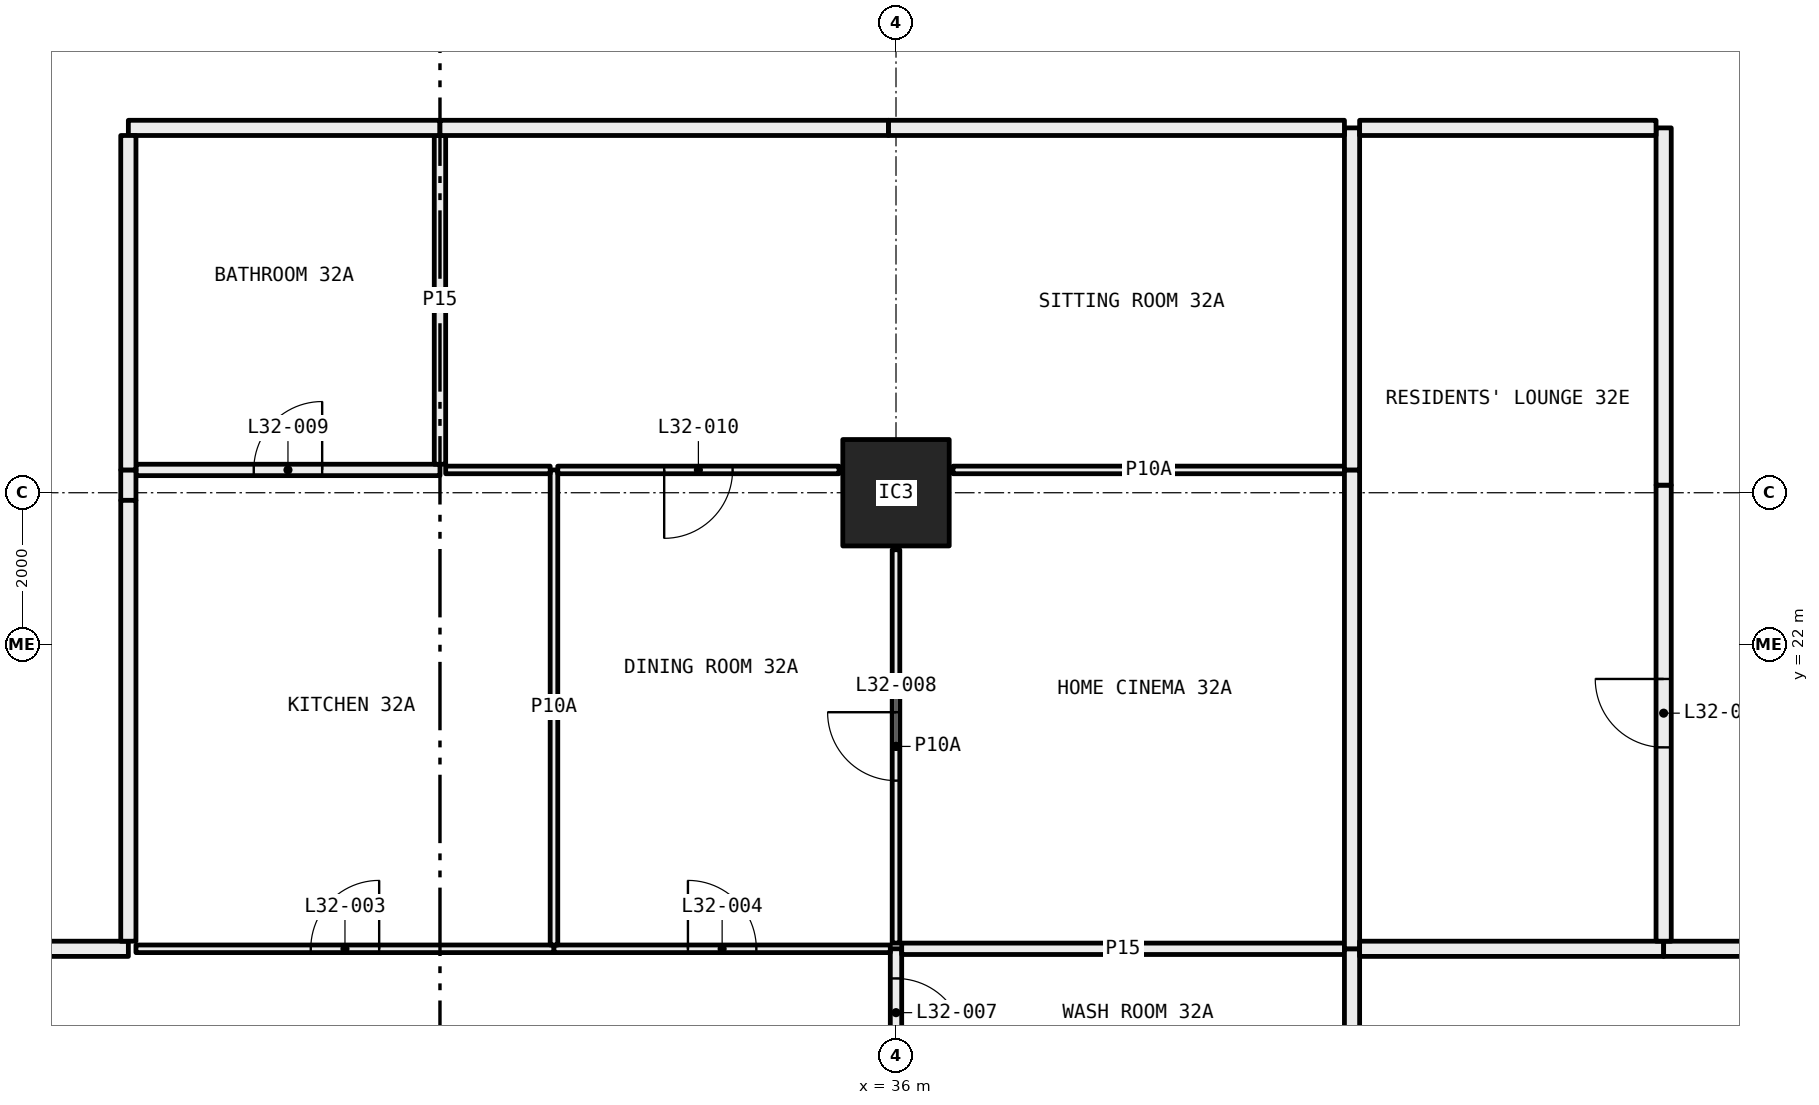
"""IFC4 building model, lengths in metres.
Left out: names, types, materials, properties, quantities, classifications, styles, units other than length and angle.
Written with IfcOpenShell. Run it as: python <this file> out.ifc"""

import sys

from ifc_helpers import new_model, si_unit, direction, frame, frame_2d, origin, origin_2d, place, context, subcontext, project, spatial, rectangle, hollow_rectangle, extrude, element, fill, save


model = new_model("IFC4")
c1 = context("Model", 3, precision=1e-05, world=origin(), true_north=direction((0.0, 1.0)))
c2 = subcontext(c1, "Body", "Model", "MODEL_VIEW")
j1 = project(units=[si_unit("LENGTHUNIT", "METRE"), si_unit("PLANEANGLEUNIT", "RADIAN")], contexts=[c1])
p1 = place(None, origin())
s1 = spatial("IfcSite", under=j1, at=p1, CompositionType="ELEMENT")
p2 = place(p1, origin())
s2 = spatial("IfcBuilding", under=s1, at=p2, CompositionType="ELEMENT")
p3 = place(p2, frame((0.0, 0.0, 124.2)))
s3 = spatial("IfcBuildingStorey", under=s2, at=p3, CompositionType="ELEMENT", Elevation=124.2)
p4 = place(p3, frame((36.0, 24.0, 0.0), z_axis=(0.0, 0.0, 1.0), x_axis=(1.0, 0.0, 0.0)))
e1 = element("IfcColumn", 1, at=p4, inside=s3, PredefinedType="COLUMN", context=c2, shape_type="SweptSolid", body=[
    extrude(hollow_rectangle(XDim=1.4, YDim=1.4, WallThickness=0.06, at=origin_2d()), origin(), (0.0, 0.0, 1.0), 3.05),
])
p5 = place(p3, frame((36.0, 16.32, 0.0), z_axis=(0.0, 0.0, 1.0), x_axis=(0.0, 1.0, 0.0)))
e2 = element("IfcWall", 2, at=p5, inside=s3, PredefinedType="PARTITIONING", context=c2, shape_type="SweptSolid", body=[
    extrude(rectangle(XDim=1.68, YDim=0.15, at=frame_2d((0.84, 0.0))), origin(), (0.0, 0.0, 1.0), 2.45),
])
p6 = place(p5, frame((0.39, 0.0, 0.0)))
e3 = element("IfcOpeningElement", 3, at=p6, cuts=e2, PredefinedType="OPENING", context=c2, shape_type="SweptSolid", body=[
    extrude(rectangle(XDim=0.9, YDim=2.1, at=frame_2d((0.45, 1.05))), frame((0.0, 0.085, 0.0), z_axis=(0.0, -1.0, 0.0), x_axis=(1.0, 0.0, 0.0)), (0.0, 0.0, 1.0), 0.17),
])
p7 = place(p3, frame((31.5, 18.0, 0.0), z_axis=(0.0, 0.0, 1.0), x_axis=(-1.0, 0.0, 0.0)))
e4 = element("IfcWall", 4, at=p7, inside=s3, PredefinedType="PARTITIONING", context=c2, shape_type="SweptSolid", body=[
    extrude(rectangle(XDim=5.5, YDim=0.1, at=frame_2d((2.75, 0.0))), origin(), (0.0, 0.0, 1.0), 3.05),
])
p8 = place(p7, frame((2.3, 0.0, 0.0)))
e5 = element("IfcOpeningElement", 5, at=p8, cuts=e4, PredefinedType="OPENING", context=c2, shape_type="SweptSolid", body=[
    extrude(rectangle(XDim=0.9, YDim=2.1, at=frame_2d((0.45, 1.05))), frame((0.0, 0.06, 0.0), z_axis=(0.0, -1.0, 0.0), x_axis=(1.0, 0.0, 0.0)), (0.0, 0.0, 1.0), 0.12),
])
p9 = place(p3, frame((35.925, 18.0, 0.0), z_axis=(0.0, 0.0, 1.0), x_axis=(-1.0, 0.0, 0.0)))
e6 = element("IfcWall", 6, at=p9, inside=s3, PredefinedType="PARTITIONING", context=c2, shape_type="SweptSolid", body=[
    extrude(rectangle(XDim=4.425, YDim=0.1, at=frame_2d((2.212, 0.0))), origin(), (0.0, 0.0, 1.0), 2.45),
])
p10 = place(p9, frame((1.762, 0.0, 0.0)))
e7 = element("IfcOpeningElement", 7, at=p10, cuts=e6, PredefinedType="OPENING", context=c2, shape_type="SweptSolid", body=[
    extrude(rectangle(XDim=0.9, YDim=2.1, at=frame_2d((0.45, 1.05))), frame((0.0, 0.06, 0.0), z_axis=(0.0, -1.0, 0.0), x_axis=(1.0, 0.0, 0.0)), (0.0, 0.0, 1.0), 0.12),
])
p11 = place(p3, frame((25.9, 18.0, 0.0), z_axis=(0.0, 0.0, 1.0), x_axis=(-1.0, 0.0, 0.0)))
e8 = element("IfcWall", 8, at=p11, inside=s3, PredefinedType="PARTITIONING", context=c2, shape_type="SweptSolid", body=[
    extrude(rectangle(XDim=1.9, YDim=0.2, at=frame_2d((0.95, 0.0))), origin(), (0.0, 0.0, 1.0), 3.05),
])
p12 = place(p3, frame((41.9, 18.0, 0.0), z_axis=(0.0, 0.0, 1.0), x_axis=(-1.0, 0.0, 0.0)))
e9 = element("IfcWall", 9, at=p12, inside=s3, PredefinedType="PARTITIONING", context=c2, shape_type="SweptSolid", body=[
    extrude(rectangle(XDim=5.825, YDim=0.15, at=frame_2d((2.913, 0.0))), origin(), (0.0, 0.0, 1.0), 2.45),
])
p13 = place(p3, frame((42.0, 16.32, 0.0), z_axis=(0.0, 0.0, 1.0), x_axis=(0.0, 1.0, 0.0)))
e10 = element("IfcWall", 10, at=p13, inside=s3, PredefinedType="PARTITIONING", context=c2, shape_type="SweptSolid", body=[
    extrude(rectangle(XDim=1.68, YDim=0.2, at=frame_2d((0.84, 0.0))), origin(), (0.0, 0.0, 1.0), 3.05),
])
p14 = place(p3, frame((31.5, 18.05, 0.0), z_axis=(0.0, 0.0, 1.0), x_axis=(0.0, 1.0, 0.0)))
e11 = element("IfcWall", 11, at=p14, inside=s3, PredefinedType="PARTITIONING", context=c2, shape_type="SweptSolid", body=[
    extrude(rectangle(XDim=6.25, YDim=0.1, at=frame_2d((3.125, 0.0))), origin(), (0.0, 0.0, 1.0), 2.45),
])
p15 = place(p3, frame((30.0, 24.3, 0.0), z_axis=(0.0, 0.0, 1.0), x_axis=(-1.0, 0.0, 0.0)))
e12 = element("IfcWall", 12, at=p15, inside=s3, PredefinedType="PARTITIONING", context=c2, shape_type="SweptSolid", body=[
    extrude(rectangle(XDim=4.0, YDim=0.15, at=frame_2d((2.0, 0.0))), origin(), (0.0, 0.0, 1.0), 3.05),
])
p16 = place(p15, frame((1.55, 0.0, 0.0)))
e13 = element("IfcOpeningElement", 13, at=p16, cuts=e12, PredefinedType="OPENING", context=c2, shape_type="SweptSolid", body=[
    extrude(rectangle(XDim=0.9, YDim=2.1, at=frame_2d((0.45, 1.05))), frame((0.0, 0.085, 0.0), z_axis=(0.0, -1.0, 0.0), x_axis=(1.0, 0.0, 0.0)), (0.0, 0.0, 1.0), 0.17),
])
p17 = place(p3, frame((31.45, 24.3, 0.0), z_axis=(0.0, 0.0, 1.0), x_axis=(-1.0, 0.0, 0.0)))
e14 = element("IfcWall", 14, at=p17, inside=s3, PredefinedType="PARTITIONING", context=c2, shape_type="SweptSolid", body=[
    extrude(rectangle(XDim=1.375, YDim=0.1, at=frame_2d((0.688, 0.0))), origin(), (0.0, 0.0, 1.0), 3.05),
])
p18 = place(p3, frame((25.9, 24.3, 0.0), z_axis=(0.0, 0.0, 1.0), x_axis=(0.0, -1.0, 0.0)))
e15 = element("IfcWall", 15, at=p18, inside=s3, PredefinedType="PARTITIONING", context=c2, shape_type="SweptSolid", body=[
    extrude(rectangle(XDim=0.4, YDim=0.2, at=frame_2d((0.2, 0.0))), origin(), (0.0, 0.0, 1.0), 2.45),
])
p19 = place(p3, frame((25.9, 23.9, 0.0), z_axis=(0.0, 0.0, 1.0), x_axis=(0.0, -1.0, 0.0)))
e16 = element("IfcWall", 16, at=p19, inside=s3, PredefinedType="PARTITIONING", context=c2, shape_type="SweptSolid", body=[
    extrude(rectangle(XDim=5.8, YDim=0.2, at=frame_2d((2.9, 0.0))), origin(), (0.0, 0.0, 1.0), 3.05),
])
p20 = place(p3, frame((36.0, 18.075, 0.0), z_axis=(0.0, 0.0, 1.0), x_axis=(0.0, 1.0, 0.0)))
e17 = element("IfcWall", 17, at=p20, inside=s3, PredefinedType="PARTITIONING", context=c2, shape_type="SweptSolid", body=[
    extrude(rectangle(XDim=5.175, YDim=0.1, at=frame_2d((2.587, 0.0))), origin(), (0.0, 0.0, 1.0), 2.45),
])
p21 = place(p20, frame((2.137, 0.0, 0.0)))
e18 = element("IfcOpeningElement", 18, at=p21, cuts=e17, PredefinedType="OPENING", context=c2, shape_type="SweptSolid", body=[
    extrude(rectangle(XDim=0.9, YDim=2.1, at=frame_2d((0.45, 1.05))), frame((0.0, 0.06, 0.0), z_axis=(0.0, -1.0, 0.0), x_axis=(1.0, 0.0, 0.0)), (0.0, 0.0, 1.0), 0.12),
])
p22 = place(p3, frame((35.25, 24.3, 0.0), z_axis=(0.0, 0.0, 1.0), x_axis=(-1.0, 0.0, 0.0)))
e19 = element("IfcWall", 19, at=p22, inside=s3, PredefinedType="PARTITIONING", context=c2, shape_type="SweptSolid", body=[
    extrude(rectangle(XDim=3.7, YDim=0.1, at=frame_2d((1.85, 0.0))), origin(), (0.0, 0.0, 1.0), 3.05),
])
p23 = place(p22, frame((1.4, 0.0, 0.0)))
e20 = element("IfcOpeningElement", 20, at=p23, cuts=e19, PredefinedType="OPENING", context=c2, shape_type="SweptSolid", body=[
    extrude(rectangle(XDim=0.9, YDim=2.1, at=frame_2d((0.45, 1.05))), frame((0.0, 0.06, 0.0), z_axis=(0.0, -1.0, 0.0), x_axis=(1.0, 0.0, 0.0)), (0.0, 0.0, 1.0), 0.12),
])
p24 = place(p3, frame((41.9, 24.3, 0.0), z_axis=(0.0, 0.0, 1.0), x_axis=(-1.0, 0.0, 0.0)))
e21 = element("IfcWall", 21, at=p24, inside=s3, PredefinedType="PARTITIONING", context=c2, shape_type="SweptSolid", body=[
    extrude(rectangle(XDim=5.15, YDim=0.1, at=frame_2d((2.575, 0.0))), origin(), (0.0, 0.0, 1.0), 3.05),
])
p25 = place(p3, frame((42.0, 18.0, 0.0), z_axis=(0.0, 0.0, 1.0), x_axis=(0.0, 1.0, 0.0)))
e22 = element("IfcWall", 22, at=p25, inside=s3, PredefinedType="PARTITIONING", context=c2, shape_type="SweptSolid", body=[
    extrude(rectangle(XDim=6.3, YDim=0.2, at=frame_2d((3.15, 0.0))), origin(), (0.0, 0.0, 1.0), 2.45),
])
p26 = place(p3, frame((30.0, 24.375, 0.0), z_axis=(0.0, 0.0, 1.0), x_axis=(0.0, 1.0, 0.0)))
e23 = element("IfcWall", 23, at=p26, inside=s3, PredefinedType="PARTITIONING", context=c2, shape_type="SweptSolid", body=[
    extrude(rectangle(XDim=4.325, YDim=0.15, at=frame_2d((2.163, 0.0))), origin(), (0.0, 0.0, 1.0), 3.05),
])
p27 = place(p3, frame((30.0, 28.8, 0.0), z_axis=(0.0, 0.0, 1.0), x_axis=(-1.0, 0.0, 0.0)))
e24 = element("IfcWall", 24, at=p27, inside=s3, PredefinedType="PARTITIONING", context=c2, shape_type="SweptSolid", body=[
    extrude(rectangle(XDim=4.1, YDim=0.2, at=frame_2d((2.05, 0.0))), origin(), (0.0, 0.0, 1.0), 3.05),
])
p28 = place(p3, frame((25.9, 28.7, 0.0), z_axis=(0.0, 0.0, 1.0), x_axis=(0.0, -1.0, 0.0)))
e25 = element("IfcWall", 25, at=p28, inside=s3, PredefinedType="PARTITIONING", context=c2, shape_type="SweptSolid", body=[
    extrude(rectangle(XDim=4.4, YDim=0.2, at=frame_2d((2.2, 0.0))), origin(), (0.0, 0.0, 1.0), 3.05),
])
p29 = place(p3, frame((42.0, 24.3, 0.0), z_axis=(0.0, 0.0, 1.0), x_axis=(0.0, 1.0, 0.0)))
e26 = element("IfcWall", 26, at=p29, inside=s3, PredefinedType="PARTITIONING", context=c2, shape_type="SweptSolid", body=[
    extrude(rectangle(XDim=4.5, YDim=0.2, at=frame_2d((2.25, 0.0))), origin(), (0.0, 0.0, 1.0), 3.05),
])
p30 = place(p3, frame((41.9, 28.8, 0.0), z_axis=(0.0, 0.0, 1.0), x_axis=(-1.0, 0.0, 0.0)))
e27 = element("IfcWall", 27, at=p30, inside=s3, PredefinedType="PARTITIONING", context=c2, shape_type="SweptSolid", body=[
    extrude(rectangle(XDim=6.0, YDim=0.2, at=frame_2d((3.0, 0.0))), origin(), (0.0, 0.0, 1.0), 2.45),
])
p31 = place(p3, frame((35.9, 28.8, 0.0), z_axis=(0.0, 0.0, 1.0), x_axis=(-1.0, 0.0, 0.0)))
e28 = element("IfcWall", 28, at=p31, inside=s3, PredefinedType="PARTITIONING", context=c2, shape_type="SweptSolid", body=[
    extrude(rectangle(XDim=5.9, YDim=0.2, at=frame_2d((2.95, 0.0))), origin(), (0.0, 0.0, 1.0), 3.05),
])
p32 = place(p3, frame((46.1, 18.0, 0.0), z_axis=(0.0, 0.0, 1.0), x_axis=(-1.0, 0.0, 0.0)))
e29 = element("IfcWall", 29, at=p32, inside=s3, PredefinedType="PARTITIONING", context=c2, shape_type="SweptSolid", body=[
    extrude(rectangle(XDim=4.0, YDim=0.2, at=frame_2d((2.0, 0.0))), origin(), (0.0, 0.0, 1.0), 3.05),
])
p33 = place(p3, frame((48.0, 18.0, 0.0), z_axis=(0.0, 0.0, 1.0), x_axis=(-1.0, 0.0, 0.0)))
e30 = element("IfcWall", 30, at=p33, inside=s3, PredefinedType="PARTITIONING", context=c2, shape_type="SweptSolid", body=[
    extrude(rectangle(XDim=1.9, YDim=0.2, at=frame_2d((0.95, 0.0))), origin(), (0.0, 0.0, 1.0), 3.05),
])
p34 = place(p3, frame((46.1, 18.1, 0.0), z_axis=(0.0, 0.0, 1.0), x_axis=(0.0, 1.0, 0.0)))
e31 = element("IfcWall", 31, at=p34, inside=s3, PredefinedType="PARTITIONING", context=c2, shape_type="SweptSolid", body=[
    extrude(rectangle(XDim=6.0, YDim=0.2, at=frame_2d((3.0, 0.0))), origin(), (0.0, 0.0, 1.0), 2.45),
])
p35 = place(p34, frame((2.55, 0.0, 0.0)))
e32 = element("IfcOpeningElement", 32, at=p35, cuts=e31, PredefinedType="OPENING", context=c2, shape_type="SweptSolid", body=[
    extrude(rectangle(XDim=0.9, YDim=2.1, at=frame_2d((0.45, 1.05))), frame((0.0, 0.11, 0.0), z_axis=(0.0, -1.0, 0.0), x_axis=(1.0, 0.0, 0.0)), (0.0, 0.0, 1.0), 0.22),
])
p36 = place(p3, frame((46.1, 24.1, 0.0), z_axis=(0.0, 0.0, 1.0), x_axis=(0.0, 1.0, 0.0)))
e33 = element("IfcWall", 33, at=p36, inside=s3, PredefinedType="PARTITIONING", context=c2, shape_type="SweptSolid", body=[
    extrude(rectangle(XDim=4.7, YDim=0.2, at=frame_2d((2.35, 0.0))), origin(), (0.0, 0.0, 1.0), 3.05),
])
p37 = place(p3, frame((46.0, 28.8, 0.0), z_axis=(0.0, 0.0, 1.0), x_axis=(-1.0, 0.0, 0.0)))
e34 = element("IfcWall", 34, at=p37, inside=s3, PredefinedType="PARTITIONING", context=c2, shape_type="SweptSolid", body=[
    extrude(rectangle(XDim=3.9, YDim=0.2, at=frame_2d((1.95, 0.0))), origin(), (0.0, 0.0, 1.0), 3.05),
])
p38 = place(p8, frame((0.9, 0.0, 0.0), x_axis=(-1.0, 0.0, 0.0)))
e35 = element("IfcDoor", 35, at=p38, inside=s3, OperationType="SINGLE_SWING_LEFT", PredefinedType="DOOR", context=c2, shape_type="SweptSolid", body=[
    extrude(rectangle(XDim=0.9, YDim=2.1, at=frame_2d((0.45, 1.05))), frame((0.0, 0.025, 0.0), z_axis=(0.0, -1.0, 0.0), x_axis=(1.0, 0.0, 0.0)), (0.0, 0.0, 1.0), 0.05),
])
fill(e5, e35)
p39 = place(p10, frame((0.9, 0.0, 0.0), x_axis=(-1.0, 0.0, 0.0)))
e36 = element("IfcDoor", 36, at=p39, inside=s3, OperationType="SINGLE_SWING_RIGHT", PredefinedType="DOOR", context=c2, shape_type="SweptSolid", body=[
    extrude(rectangle(XDim=0.9, YDim=2.1, at=frame_2d((0.45, 1.05))), frame((0.0, 0.025, 0.0), z_axis=(0.0, -1.0, 0.0), x_axis=(1.0, 0.0, 0.0)), (0.0, 0.0, 1.0), 0.05),
])
fill(e7, e36)
p40 = place(p6, frame((0.9, 0.0, 0.0), x_axis=(-1.0, 0.0, 0.0)))
e37 = element("IfcDoor", 37, at=p40, inside=s3, OperationType="SINGLE_SWING_LEFT", PredefinedType="DOOR", context=c2, shape_type="SweptSolid", body=[
    extrude(rectangle(XDim=0.9, YDim=2.1, at=frame_2d((0.45, 1.05))), frame((0.0, 0.025, 0.0), z_axis=(0.0, -1.0, 0.0), x_axis=(1.0, 0.0, 0.0)), (0.0, 0.0, 1.0), 0.05),
])
fill(e3, e37)
p41 = place(p21, origin())
e38 = element("IfcDoor", 38, at=p41, inside=s3, OperationType="SINGLE_SWING_LEFT", PredefinedType="DOOR", context=c2, shape_type="SweptSolid", body=[
    extrude(rectangle(XDim=0.9, YDim=2.1, at=frame_2d((0.45, 1.05))), frame((0.0, 0.025, 0.0), z_axis=(0.0, -1.0, 0.0), x_axis=(1.0, 0.0, 0.0)), (0.0, 0.0, 1.0), 0.05),
])
fill(e18, e38)
p42 = place(p16, frame((0.9, 0.0, 0.0), x_axis=(-1.0, 0.0, 0.0)))
e39 = element("IfcDoor", 39, at=p42, inside=s3, OperationType="SINGLE_SWING_LEFT", PredefinedType="DOOR", context=c2, shape_type="SweptSolid", body=[
    extrude(rectangle(XDim=0.9, YDim=2.1, at=frame_2d((0.45, 1.05))), frame((0.0, 0.025, 0.0), z_axis=(0.0, -1.0, 0.0), x_axis=(1.0, 0.0, 0.0)), (0.0, 0.0, 1.0), 0.05),
])
fill(e13, e39)
p43 = place(p23, origin())
e40 = element("IfcDoor", 40, at=p43, inside=s3, OperationType="SINGLE_SWING_LEFT", PredefinedType="DOOR", context=c2, shape_type="SweptSolid", body=[
    extrude(rectangle(XDim=0.9, YDim=2.1, at=frame_2d((0.45, 1.05))), frame((0.0, 0.025, 0.0), z_axis=(0.0, -1.0, 0.0), x_axis=(1.0, 0.0, 0.0)), (0.0, 0.0, 1.0), 0.05),
])
fill(e20, e40)
p44 = place(p35, origin())
e41 = element("IfcDoor", 41, at=p44, inside=s3, OperationType="SINGLE_SWING_LEFT", PredefinedType="DOOR", context=c2, shape_type="SweptSolid", body=[
    extrude(rectangle(XDim=0.9, YDim=2.1, at=frame_2d((0.45, 1.05))), frame((0.0, 0.025, 0.0), z_axis=(0.0, -1.0, 0.0), x_axis=(1.0, 0.0, 0.0)), (0.0, 0.0, 1.0), 0.05),
])
fill(e32, e41)
save(model, sys.argv[1])
